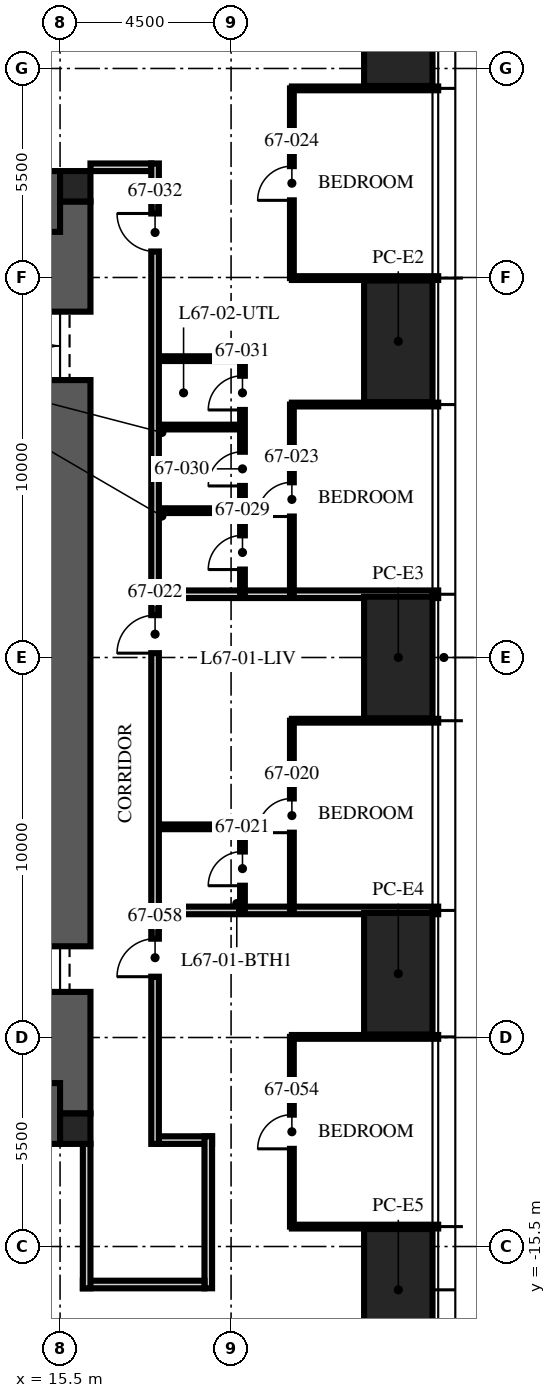
"""IFC4 building model, lengths in metres.
Left out: names, types, materials, properties, quantities, classifications, styles, units other than length and angle.
Written with IfcOpenShell. Run it as: python <this file> out.ifc"""

import sys

from ifc_helpers import new_model, si_unit, direction, frame, frame_2d, origin, origin_2d, place, context, subcontext, project, spatial, rectangle, hollow_rectangle, extrude, element, fill, save


model = new_model("IFC4")
c1 = context("Model", 3, precision=1e-05, world=origin(), true_north=direction((0.0, 1.0)))
c2 = subcontext(c1, "Body", "Model", "MODEL_VIEW")
j1 = project(units=[si_unit("LENGTHUNIT", "METRE"), si_unit("PLANEANGLEUNIT", "RADIAN")], contexts=[c1])
p1 = place(None, origin())
s1 = spatial("IfcSite", under=j1, at=p1, CompositionType="ELEMENT")
p2 = place(p1, origin())
s2 = spatial("IfcBuilding", under=s1, at=p2, CompositionType="ELEMENT")
p3 = place(p2, frame((0.0, 0.0, 267.0)))
s3 = spatial("IfcBuildingStorey", under=s2, at=p3, CompositionType="ELEMENT", Elevation=267.0)
p4 = place(p3, frame((15.5, -12.0, -0.25), z_axis=(0.0, 0.0, 1.0), x_axis=(0.0, 1.0, 0.0)))
e1 = element("IfcWall", 1, at=p4, inside=s3, PredefinedType="SHEAR", context=c2, shape_type="SweptSolid", body=[
    extrude(rectangle(XDim=24.0, YDim=1.6, at=frame_2d((12.0, 0.0))), origin(), (0.0, 0.0, 1.0), 3.75),
])
p5 = place(p4, frame((3.2, 0.0, 0.25)))
e2 = element("IfcOpeningElement", 2, at=p5, cuts=e1, PredefinedType="OPENING", context=c2, shape_type="SweptSolid", body=[
    extrude(rectangle(XDim=1.2, YDim=2.1, at=frame_2d((0.6, 1.05))), frame((0.0, 0.81, 0.0), z_axis=(0.0, -1.0, 0.0), x_axis=(1.0, 0.0, 0.0)), (0.0, 0.0, 1.0), 1.62),
])
p6 = place(p4, frame((19.3, 0.0, 0.25)))
e3 = element("IfcOpeningElement", 3, at=p6, cuts=e1, PredefinedType="OPENING", context=c2, shape_type="SweptSolid", body=[
    extrude(rectangle(XDim=1.8, YDim=2.1, at=frame_2d((0.9, 1.05))), frame((0.0, 0.81, 0.0), z_axis=(0.0, -1.0, 0.0), x_axis=(1.0, 0.0, 0.0)), (0.0, 0.0, 1.0), 1.62),
])
for number, where, z_axis, x_axis in (
    (4, (-15.5, 12.0, -0.25), (0.0, 0.0, 1.0), (1.0, 0.0, 0.0)),
    (5, (-15.5, -12.0, -0.25), (0.0, 0.0, 1.0), (1.0, 0.0, 0.0)),
):
    element("IfcWall", number, at=place(p3, frame(where, z_axis=z_axis, x_axis=x_axis)), inside=s3, PredefinedType="SHEAR", context=c2, shape_type="SweptSolid", body=[
        extrude(rectangle(XDim=31.0, YDim=1.6, at=frame_2d((15.5, 0.0))), origin(), (0.0, 0.0, 1.0), 3.75),
    ])
for number, where, z_axis, x_axis in (
    (6, (15.9, 12.4, -0.25), (0.0, 0.0, 1.0), (1.0, 0.0, 0.0)),
    (7, (15.9, -12.4, -0.25), (0.0, 0.0, 1.0), (1.0, 0.0, 0.0)),
):
    element("IfcColumn", number, at=place(p3, frame(where, z_axis=z_axis, x_axis=x_axis)), inside=s3, PredefinedType="COLUMN", context=c2, shape_type="SweptSolid", body=[
        extrude(rectangle(XDim=0.8, YDim=0.8, at=origin_2d()), origin(), (0.0, 0.0, 1.0), 3.75),
    ])
for number, where, z_axis, x_axis in (
    (8, (24.4, 16.64, 0.0), (0.0, 0.0, 1.0), (0.0, 1.0, 0.0)),
    (9, (24.4, 8.32, 0.0), (0.0, 0.0, 1.0), (0.0, 1.0, 0.0)),
    (10, (24.4, 0.0, 0.0), (0.0, 0.0, 1.0), (0.0, 1.0, 0.0)),
    (11, (24.4, -8.32, 0.0), (0.0, 0.0, 1.0), (0.0, 1.0, 0.0)),
    (12, (24.4, -16.64, 0.0), (0.0, 0.0, 1.0), (0.0, 1.0, 0.0)),
):
    element("IfcColumn", number, at=place(p3, frame(where, z_axis=z_axis, x_axis=x_axis)), inside=s3, PredefinedType="COLUMN", context=c2, shape_type="SweptSolid", body=[
        extrude(hollow_rectangle(XDim=3.2, YDim=1.8, WallThickness=0.14, at=origin_2d()), origin(), (0.0, 0.0, 1.0), 3.75),
    ])
p7 = place(p3, frame((18.1, -12.7, 0.0), z_axis=(0.0, 0.0, 1.0), x_axis=(1.0, 0.0, 0.0)))
e13 = element("IfcWall", 13, at=p7, inside=s3, PredefinedType="PARTITIONING", context=c2, shape_type="SweptSolid", body=[
    extrude(rectangle(XDim=1.4, YDim=0.2, at=frame_2d((0.7, 0.0))), origin(), (0.0, 0.0, 1.0), 2.81),
])
p8 = place(p3, frame((19.4, -12.6, 0.0), z_axis=(0.0, 0.0, 1.0), x_axis=(0.0, -1.0, 0.0)))
e14 = element("IfcWall", 14, at=p8, inside=s3, PredefinedType="PARTITIONING", context=c2, shape_type="SweptSolid", body=[
    extrude(rectangle(XDim=4.0, YDim=0.2, at=frame_2d((2.0, 0.0))), origin(), (0.0, 0.0, 1.0), 2.6),
])
p9 = place(p3, frame((19.3, -16.5, 0.0), z_axis=(0.0, 0.0, 1.0), x_axis=(-1.0, 0.0, 0.0)))
e15 = element("IfcWall", 15, at=p9, inside=s3, PredefinedType="PARTITIONING", context=c2, shape_type="SweptSolid", body=[
    extrude(rectangle(XDim=3.2, YDim=0.2, at=frame_2d((1.6, 0.0))), origin(), (0.0, 0.0, 1.0), 2.3),
])
p10 = place(p3, frame((16.2, -16.6, 0.0), z_axis=(0.0, 0.0, 1.0), x_axis=(0.0, 1.0, 0.0)))
e16 = element("IfcWall", 16, at=p10, inside=s3, PredefinedType="PARTITIONING", context=c2, shape_type="SweptSolid", body=[
    extrude(rectangle(XDim=3.8, YDim=0.2, at=frame_2d((1.9, 0.0))), origin(), (0.0, 0.0, 1.0), 2.3),
])
p11 = place(p3, frame((16.3, 12.9, 0.0), z_axis=(0.0, 0.0, 1.0), x_axis=(1.0, 0.0, 0.0)))
e17 = element("IfcWall", 17, at=p11, inside=s3, PredefinedType="PARTITIONING", context=c2, shape_type="SweptSolid", body=[
    extrude(rectangle(XDim=1.6, YDim=0.2, at=frame_2d((0.8, 0.0))), origin(), (0.0, 0.0, 1.0), 2.3),
])
p12 = place(p3, frame((18.1, -6.656, 0.0), z_axis=(0.0, 0.0, 1.0), x_axis=(1.0, 0.0, 0.0)))
e18 = element("IfcWall", 18, at=p12, inside=s3, PredefinedType="PARTITIONING", context=c2, shape_type="SweptSolid", body=[
    extrude(rectangle(XDim=7.35, YDim=0.2, at=frame_2d((3.675, 0.0))), origin(), (0.0, 0.0, 1.0), 2.91),
])
p13 = place(p3, frame((21.6, -1.664, 0.0), z_axis=(0.0, 0.0, 1.0), x_axis=(1.0, 0.0, 0.0)))
e19 = element("IfcWall", 19, at=p13, inside=s3, PredefinedType="PARTITIONING", context=c2, shape_type="SweptSolid", body=[
    extrude(rectangle(XDim=3.85, YDim=0.1, at=frame_2d((1.925, 0.0))), origin(), (0.0, 0.0, 1.0), 2.91),
])
p14 = place(p3, frame((18.1, 1.664, 0.0), z_axis=(0.0, 0.0, 1.0), x_axis=(1.0, 0.0, 0.0)))
e20 = element("IfcWall", 20, at=p14, inside=s3, PredefinedType="PARTITIONING", context=c2, shape_type="SweptSolid", body=[
    extrude(rectangle(XDim=7.35, YDim=0.2, at=frame_2d((3.675, 0.0))), origin(), (0.0, 0.0, 1.0), 2.91),
])
for number, where, z_axis, x_axis in (
    (21, (21.6, 6.656, 0.0), (0.0, 0.0, 1.0), (1.0, 0.0, 0.0)),
    (22, (21.6, 9.984, 0.0), (0.0, 0.0, 1.0), (1.0, 0.0, 0.0)),
    (23, (21.6, 14.976, 0.0), (0.0, 0.0, 1.0), (1.0, 0.0, 0.0)),
    (24, (21.6, -14.976, 0.0), (0.0, 0.0, 1.0), (1.0, 0.0, 0.0)),
    (25, (21.6, -9.984, 0.0), (0.0, 0.0, 1.0), (1.0, 0.0, 0.0)),
):
    element("IfcWall", number, at=place(p3, frame(where, z_axis=z_axis, x_axis=x_axis)), inside=s3, PredefinedType="PARTITIONING", context=c2, shape_type="SweptSolid", body=[
        extrude(rectangle(XDim=3.85, YDim=0.1, at=frame_2d((1.925, 0.0))), origin(), (0.0, 0.0, 1.0), 2.91),
    ])
p15 = place(p3, frame((21.6, -6.656, 0.0), z_axis=(0.0, 0.0, 1.0), x_axis=(0.0, 1.0, 0.0)))
e26 = element("IfcWall", 26, at=p15, inside=s3, PredefinedType="PARTITIONING", context=c2, shape_type="SweptSolid", body=[
    extrude(rectangle(XDim=4.992, YDim=0.1, at=frame_2d((2.496, 0.0))), origin(), (0.0, 0.0, 1.0), 2.81),
])
p16 = place(p15, frame((2.046, 0.0, 0.0)))
e27 = element("IfcOpeningElement", 27, at=p16, cuts=e26, PredefinedType="OPENING", context=c2, shape_type="SweptSolid", body=[
    extrude(rectangle(XDim=0.9, YDim=2.1, at=frame_2d((0.45, 1.05))), frame((0.0, 0.06, 0.0), z_axis=(0.0, -1.0, 0.0), x_axis=(1.0, 0.0, 0.0)), (0.0, 0.0, 1.0), 0.12),
])
p17 = place(p3, frame((20.3, -6.656, 0.0), z_axis=(0.0, 0.0, 1.0), x_axis=(0.0, 1.0, 0.0)))
e28 = element("IfcWall", 28, at=p17, inside=s3, PredefinedType="PARTITIONING", context=c2, shape_type="SweptSolid", body=[
    extrude(rectangle(XDim=2.2, YDim=0.125, at=frame_2d((1.1, 0.0))), origin(), (0.0, 0.0, 1.0), 3.5),
])
p18 = place(p17, frame((0.65, 0.0, 0.0)))
e29 = element("IfcOpeningElement", 29, at=p18, cuts=e28, PredefinedType="OPENING", context=c2, shape_type="SweptSolid", body=[
    extrude(rectangle(XDim=0.9, YDim=2.1, at=frame_2d((0.45, 1.05))), frame((0.0, 0.073, 0.0), z_axis=(0.0, -1.0, 0.0), x_axis=(1.0, 0.0, 0.0)), (0.0, 0.0, 1.0), 0.145),
])
p19 = place(p3, frame((18.1, -4.456, 0.0), z_axis=(0.0, 0.0, 1.0), x_axis=(1.0, 0.0, 0.0)))
e30 = element("IfcWall", 30, at=p19, inside=s3, PredefinedType="PARTITIONING", context=c2, shape_type="SweptSolid", body=[
    extrude(rectangle(XDim=2.2, YDim=0.125, at=frame_2d((1.1, 0.0))), origin(), (0.0, 0.0, 1.0), 3.5),
])
p20 = place(p3, frame((21.6, 1.664, 0.0), z_axis=(0.0, 0.0, 1.0), x_axis=(0.0, 1.0, 0.0)))
e31 = element("IfcWall", 31, at=p20, inside=s3, PredefinedType="PARTITIONING", context=c2, shape_type="SweptSolid", body=[
    extrude(rectangle(XDim=4.992, YDim=0.1, at=frame_2d((2.496, 0.0))), origin(), (0.0, 0.0, 1.0), 2.81),
])
p21 = place(p20, frame((2.046, 0.0, 0.0)))
e32 = element("IfcOpeningElement", 32, at=p21, cuts=e31, PredefinedType="OPENING", context=c2, shape_type="SweptSolid", body=[
    extrude(rectangle(XDim=0.9, YDim=2.1, at=frame_2d((0.45, 1.05))), frame((0.0, 0.06, 0.0), z_axis=(0.0, -1.0, 0.0), x_axis=(1.0, 0.0, 0.0)), (0.0, 0.0, 1.0), 0.12),
])
p22 = place(p3, frame((21.6, 9.984, 0.0), z_axis=(0.0, 0.0, 1.0), x_axis=(0.0, 1.0, 0.0)))
e33 = element("IfcWall", 33, at=p22, inside=s3, PredefinedType="PARTITIONING", context=c2, shape_type="SweptSolid", body=[
    extrude(rectangle(XDim=4.992, YDim=0.1, at=frame_2d((2.496, 0.0))), origin(), (0.0, 0.0, 1.0), 2.81),
])
p23 = place(p22, frame((2.046, 0.0, 0.0)))
e34 = element("IfcOpeningElement", 34, at=p23, cuts=e33, PredefinedType="OPENING", context=c2, shape_type="SweptSolid", body=[
    extrude(rectangle(XDim=0.9, YDim=2.1, at=frame_2d((0.45, 1.05))), frame((0.0, 0.06, 0.0), z_axis=(0.0, -1.0, 0.0), x_axis=(1.0, 0.0, 0.0)), (0.0, 0.0, 1.0), 0.12),
])
p24 = place(p3, frame((20.3, 1.664, 0.0), z_axis=(0.0, 0.0, 1.0), x_axis=(0.0, 1.0, 0.0)))
e35 = element("IfcWall", 35, at=p24, inside=s3, PredefinedType="PARTITIONING", context=c2, shape_type="SweptSolid", body=[
    extrude(rectangle(XDim=6.2, YDim=0.125, at=frame_2d((3.1, 0.0))), origin(), (0.0, 0.0, 1.0), 2.81),
])
p25 = place(p24, frame((0.65, 0.0, 0.0)))
e36 = element("IfcOpeningElement", 36, at=p25, cuts=e35, PredefinedType="OPENING", context=c2, shape_type="SweptSolid", body=[
    extrude(rectangle(XDim=0.9, YDim=2.1, at=frame_2d((0.45, 1.05))), frame((0.0, 0.073, 0.0), z_axis=(0.0, -1.0, 0.0), x_axis=(1.0, 0.0, 0.0)), (0.0, 0.0, 1.0), 0.145),
])
p26 = place(p24, frame((2.85, 0.0, 0.0)))
e37 = element("IfcOpeningElement", 37, at=p26, cuts=e35, PredefinedType="OPENING", context=c2, shape_type="SweptSolid", body=[
    extrude(rectangle(XDim=0.9, YDim=2.1, at=frame_2d((0.45, 1.05))), frame((0.0, 0.073, 0.0), z_axis=(0.0, -1.0, 0.0), x_axis=(1.0, 0.0, 0.0)), (0.0, 0.0, 1.0), 0.145),
])
p27 = place(p24, frame((4.85, 0.0, 0.0)))
e38 = element("IfcOpeningElement", 38, at=p27, cuts=e35, PredefinedType="OPENING", context=c2, shape_type="SweptSolid", body=[
    extrude(rectangle(XDim=0.9, YDim=2.1, at=frame_2d((0.45, 1.05))), frame((0.0, 0.073, 0.0), z_axis=(0.0, -1.0, 0.0), x_axis=(1.0, 0.0, 0.0)), (0.0, 0.0, 1.0), 0.145),
])
for number, where, z_axis, x_axis in (
    (39, (18.1, 3.864, 0.0), (0.0, 0.0, 1.0), (1.0, 0.0, 0.0)),
    (40, (18.1, 6.064, 0.0), (0.0, 0.0, 1.0), (1.0, 0.0, 0.0)),
    (41, (18.1, 7.864, 0.0), (0.0, 0.0, 1.0), (1.0, 0.0, 0.0)),
):
    element("IfcWall", number, at=place(p3, frame(where, z_axis=z_axis, x_axis=x_axis)), inside=s3, PredefinedType="PARTITIONING", context=c2, shape_type="SweptSolid", body=[
        extrude(rectangle(XDim=2.2, YDim=0.125, at=frame_2d((1.1, 0.0))), origin(), (0.0, 0.0, 1.0), 3.5),
    ])
p28 = place(p3, frame((21.6, -14.976, 0.0), z_axis=(0.0, 0.0, 1.0), x_axis=(0.0, 1.0, 0.0)))
e42 = element("IfcWall", 42, at=p28, inside=s3, PredefinedType="PARTITIONING", context=c2, shape_type="SweptSolid", body=[
    extrude(rectangle(XDim=4.992, YDim=0.1, at=frame_2d((2.496, 0.0))), origin(), (0.0, 0.0, 1.0), 2.81),
])
p29 = place(p28, frame((2.046, 0.0, 0.0)))
e43 = element("IfcOpeningElement", 43, at=p29, cuts=e42, PredefinedType="OPENING", context=c2, shape_type="SweptSolid", body=[
    extrude(rectangle(XDim=0.9, YDim=2.1, at=frame_2d((0.45, 1.05))), frame((0.0, 0.06, 0.0), z_axis=(0.0, -1.0, 0.0), x_axis=(1.0, 0.0, 0.0)), (0.0, 0.0, 1.0), 0.12),
])
p30 = place(p3, frame((18.0, -12.8, 0.0), z_axis=(0.0, 0.0, 1.0), x_axis=(0.0, 1.0, 0.0)))
e44 = element("IfcWall", 44, at=p30, inside=s3, PredefinedType="PARTITIONING", context=c2, shape_type="SweptSolid", body=[
    extrude(rectangle(XDim=25.8, YDim=0.2, at=frame_2d((12.9, 0.0))), origin(), (0.0, 0.0, 1.0), 2.6),
])
p31 = place(p30, frame((12.914, 0.0, 0.0)))
e45 = element("IfcOpeningElement", 45, at=p31, cuts=e44, PredefinedType="OPENING", context=c2, shape_type="SweptSolid", body=[
    extrude(rectangle(XDim=1.0, YDim=2.2, at=frame_2d((0.5, 1.1))), frame((0.0, 0.11, 0.0), z_axis=(0.0, -1.0, 0.0), x_axis=(1.0, 0.0, 0.0)), (0.0, 0.0, 1.0), 0.22),
])
p32 = place(p30, frame((23.484, 0.0, 0.0)))
e46 = element("IfcOpeningElement", 46, at=p32, cuts=e44, PredefinedType="OPENING", context=c2, shape_type="SweptSolid", body=[
    extrude(rectangle(XDim=1.0, YDim=2.2, at=frame_2d((0.5, 1.1))), frame((0.0, 0.11, 0.0), z_axis=(0.0, -1.0, 0.0), x_axis=(1.0, 0.0, 0.0)), (0.0, 0.0, 1.0), 0.22),
])
p33 = place(p30, frame((4.4, 0.0, 0.0)))
e47 = element("IfcOpeningElement", 47, at=p33, cuts=e44, PredefinedType="OPENING", context=c2, shape_type="SweptSolid", body=[
    extrude(rectangle(XDim=1.0, YDim=2.2, at=frame_2d((0.5, 1.1))), frame((0.0, 0.11, 0.0), z_axis=(0.0, -1.0, 0.0), x_axis=(1.0, 0.0, 0.0)), (0.0, 0.0, 1.0), 0.22),
])
p34 = place(p5, origin())
e48 = element("IfcDoor", 48, at=p34, inside=s3, OperationType="SINGLE_SWING_LEFT", PredefinedType="DOOR", context=c2, shape_type="SweptSolid", body=[
    extrude(rectangle(XDim=1.2, YDim=2.1, at=frame_2d((0.6, 1.05))), frame((0.0, 0.025, 0.0), z_axis=(0.0, -1.0, 0.0), x_axis=(1.0, 0.0, 0.0)), (0.0, 0.0, 1.0), 0.05),
])
fill(e2, e48)
p35 = place(p6, origin())
e49 = element("IfcDoor", 49, at=p35, inside=s3, OperationType="DOUBLE_DOOR_SINGLE_SWING", PredefinedType="DOOR", context=c2, shape_type="SweptSolid", body=[
    extrude(rectangle(XDim=1.8, YDim=2.1, at=frame_2d((0.9, 1.05))), frame((0.0, 0.025, 0.0), z_axis=(0.0, -1.0, 0.0), x_axis=(1.0, 0.0, 0.0)), (0.0, 0.0, 1.0), 0.05),
])
fill(e3, e49)
p36 = place(p16, origin())
e50 = element("IfcDoor", 50, at=p36, inside=s3, OperationType="SINGLE_SWING_LEFT", PredefinedType="DOOR", context=c2, shape_type="SweptSolid", body=[
    extrude(rectangle(XDim=0.9, YDim=2.1, at=frame_2d((0.45, 1.05))), frame((0.0, 0.025, 0.0), z_axis=(0.0, -1.0, 0.0), x_axis=(1.0, 0.0, 0.0)), (0.0, 0.0, 1.0), 0.05),
])
fill(e27, e50)
p37 = place(p18, origin())
e51 = element("IfcDoor", 51, at=p37, inside=s3, OperationType="SINGLE_SWING_LEFT", PredefinedType="DOOR", context=c2, shape_type="SweptSolid", body=[
    extrude(rectangle(XDim=0.9, YDim=2.1, at=frame_2d((0.45, 1.05))), frame((0.0, 0.025, 0.0), z_axis=(0.0, -1.0, 0.0), x_axis=(1.0, 0.0, 0.0)), (0.0, 0.0, 1.0), 0.05),
])
fill(e29, e51)
p38 = place(p31, origin())
e52 = element("IfcDoor", 52, at=p38, inside=s3, OperationType="SINGLE_SWING_LEFT", PredefinedType="DOOR", context=c2, shape_type="SweptSolid", body=[
    extrude(rectangle(XDim=1.0, YDim=2.2, at=frame_2d((0.5, 1.1))), frame((0.0, 0.025, 0.0), z_axis=(0.0, -1.0, 0.0), x_axis=(1.0, 0.0, 0.0)), (0.0, 0.0, 1.0), 0.05),
])
fill(e45, e52)
p39 = place(p21, origin())
e53 = element("IfcDoor", 53, at=p39, inside=s3, OperationType="SINGLE_SWING_LEFT", PredefinedType="DOOR", context=c2, shape_type="SweptSolid", body=[
    extrude(rectangle(XDim=0.9, YDim=2.1, at=frame_2d((0.45, 1.05))), frame((0.0, 0.025, 0.0), z_axis=(0.0, -1.0, 0.0), x_axis=(1.0, 0.0, 0.0)), (0.0, 0.0, 1.0), 0.05),
])
fill(e32, e53)
p40 = place(p23, origin())
e54 = element("IfcDoor", 54, at=p40, inside=s3, OperationType="SINGLE_SWING_LEFT", PredefinedType="DOOR", context=c2, shape_type="SweptSolid", body=[
    extrude(rectangle(XDim=0.9, YDim=2.1, at=frame_2d((0.45, 1.05))), frame((0.0, 0.025, 0.0), z_axis=(0.0, -1.0, 0.0), x_axis=(1.0, 0.0, 0.0)), (0.0, 0.0, 1.0), 0.05),
])
fill(e34, e54)
p41 = place(p25, origin())
e55 = element("IfcDoor", 55, at=p41, inside=s3, OperationType="SINGLE_SWING_LEFT", PredefinedType="DOOR", context=c2, shape_type="SweptSolid", body=[
    extrude(rectangle(XDim=0.9, YDim=2.1, at=frame_2d((0.45, 1.05))), frame((0.0, 0.025, 0.0), z_axis=(0.0, -1.0, 0.0), x_axis=(1.0, 0.0, 0.0)), (0.0, 0.0, 1.0), 0.05),
])
fill(e36, e55)
p42 = place(p26, origin())
e56 = element("IfcDoor", 56, at=p42, inside=s3, OperationType="SINGLE_SWING_LEFT", PredefinedType="DOOR", context=c2, shape_type="SweptSolid", body=[
    extrude(rectangle(XDim=0.9, YDim=2.1, at=frame_2d((0.45, 1.05))), frame((0.0, 0.025, 0.0), z_axis=(0.0, -1.0, 0.0), x_axis=(1.0, 0.0, 0.0)), (0.0, 0.0, 1.0), 0.05),
])
fill(e37, e56)
p43 = place(p27, origin())
e57 = element("IfcDoor", 57, at=p43, inside=s3, OperationType="SINGLE_SWING_LEFT", PredefinedType="DOOR", context=c2, shape_type="SweptSolid", body=[
    extrude(rectangle(XDim=0.9, YDim=2.1, at=frame_2d((0.45, 1.05))), frame((0.0, 0.025, 0.0), z_axis=(0.0, -1.0, 0.0), x_axis=(1.0, 0.0, 0.0)), (0.0, 0.0, 1.0), 0.05),
])
fill(e38, e57)
p44 = place(p32, origin())
e58 = element("IfcDoor", 58, at=p44, inside=s3, OperationType="SINGLE_SWING_RIGHT", PredefinedType="DOOR", context=c2, shape_type="SweptSolid", body=[
    extrude(rectangle(XDim=1.0, YDim=2.2, at=frame_2d((0.5, 1.1))), frame((0.0, 0.025, 0.0), z_axis=(0.0, -1.0, 0.0), x_axis=(1.0, 0.0, 0.0)), (0.0, 0.0, 1.0), 0.05),
])
fill(e46, e58)
p45 = place(p29, origin())
e59 = element("IfcDoor", 59, at=p45, inside=s3, OperationType="SINGLE_SWING_LEFT", PredefinedType="DOOR", context=c2, shape_type="SweptSolid", body=[
    extrude(rectangle(XDim=0.9, YDim=2.1, at=frame_2d((0.45, 1.05))), frame((0.0, 0.025, 0.0), z_axis=(0.0, -1.0, 0.0), x_axis=(1.0, 0.0, 0.0)), (0.0, 0.0, 1.0), 0.05),
])
fill(e43, e59)
p46 = place(p33, origin())
e60 = element("IfcDoor", 60, at=p46, inside=s3, OperationType="SINGLE_SWING_LEFT", PredefinedType="DOOR", context=c2, shape_type="SweptSolid", body=[
    extrude(rectangle(XDim=1.0, YDim=2.2, at=frame_2d((0.5, 1.1))), frame((0.0, 0.025, 0.0), z_axis=(0.0, -1.0, 0.0), x_axis=(1.0, 0.0, 0.0)), (0.0, 0.0, 1.0), 0.05),
])
fill(e47, e60)
save(model, sys.argv[1])
